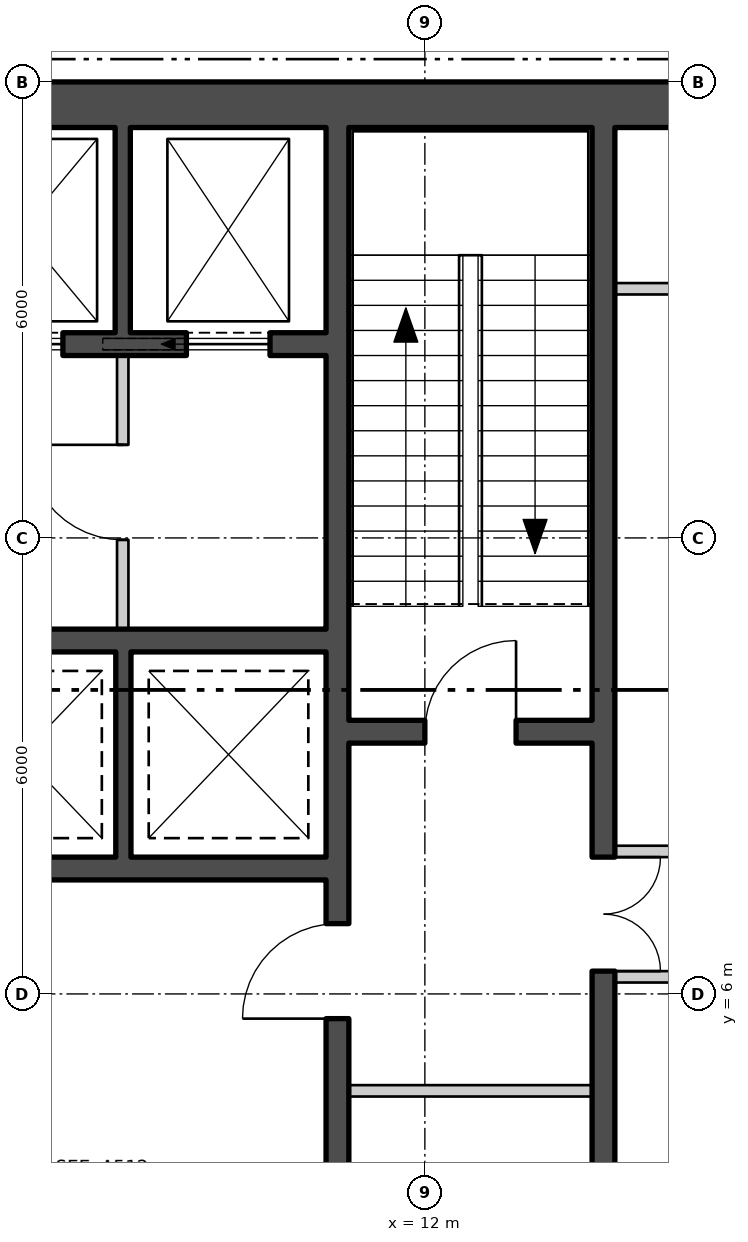
"""IFC4 building model, lengths in metres.
Left out: names, types, materials, properties, quantities, classifications, styles, units other than length and angle.
Written with IfcOpenShell. Run it as: python <this file> out.ifc"""

import sys

from ifc_helpers import new_model, si_unit, direction, frame, frame_2d, origin, place, context, subcontext, project, spatial, polyline, rectangle, outline, extrude, element, fill, save


model = new_model("IFC4")
c1 = context("Model", 3, precision=1e-05, world=origin(), true_north=direction((0.0, 1.0)))
c2 = subcontext(c1, "Body", "Model", "MODEL_VIEW")
j1 = project(units=[si_unit("LENGTHUNIT", "METRE"), si_unit("PLANEANGLEUNIT", "RADIAN")], contexts=[c1])
p1 = place(None, origin())
s1 = spatial("IfcSite", under=j1, at=p1, CompositionType="ELEMENT")
p2 = place(p1, origin())
s2 = spatial("IfcBuilding", under=s1, at=p2, CompositionType="ELEMENT")
p3 = place(p2, frame((0.0, 0.0, 60.3)))
s3 = spatial("IfcBuildingStorey", under=s2, at=p3, CompositionType="ELEMENT", Elevation=60.3)
p4 = place(p3, frame((5.425, -29.042, -0.18), z_axis=(0.0, 0.0, 1.0), x_axis=(0.499999388847, 0.866025756634, 0.0)))
e1 = element("IfcWall", 1, at=p4, inside=s3, PredefinedType="SOLIDWALL", context=c2, shape_type="SweptSolid", body=[
    extrude(outline(polyline([(-0.13, -0.225), (45.88, -0.225), (45.62, 0.225), (0.13, 0.225), (-0.13, -0.225)])), origin(), (0.0, 0.0, 1.0), 4.28),
])
p5 = place(p4, frame((1.425, 0.0, 1.08)))
e2 = element("IfcOpeningElement", 2, at=p5, cuts=e1, PredefinedType="OPENING", context=c2, shape_type="SweptSolid", body=[
    extrude(rectangle(XDim=2.4, YDim=2.6, at=frame_2d((1.2, 1.3))), frame((0.0, 0.235, 0.0), z_axis=(0.0, -1.0, 0.0), x_axis=(1.0, 0.0, 0.0)), (0.0, 0.0, 1.0), 0.47),
])
p6 = place(p4, frame((5.895, 0.0, 1.08)))
e3 = element("IfcOpeningElement", 3, at=p6, cuts=e1, PredefinedType="OPENING", context=c2, shape_type="SweptSolid", body=[
    extrude(rectangle(XDim=2.4, YDim=2.6, at=frame_2d((1.2, 1.3))), frame((0.0, 0.235, 0.0), z_axis=(0.0, -1.0, 0.0), x_axis=(1.0, 0.0, 0.0)), (0.0, 0.0, 1.0), 0.47),
])
p7 = place(p4, frame((10.403, 0.0, 1.08)))
e4 = element("IfcOpeningElement", 4, at=p7, cuts=e1, PredefinedType="OPENING", context=c2, shape_type="SweptSolid", body=[
    extrude(rectangle(XDim=2.4, YDim=2.6, at=frame_2d((1.2, 1.3))), frame((0.0, 0.235, 0.0), z_axis=(0.0, -1.0, 0.0), x_axis=(1.0, 0.0, 0.0)), (0.0, 0.0, 1.0), 0.47),
])
p8 = place(p4, frame((14.912, 0.0, 1.08)))
e5 = element("IfcOpeningElement", 5, at=p8, cuts=e1, PredefinedType="OPENING", context=c2, shape_type="SweptSolid", body=[
    extrude(rectangle(XDim=2.4, YDim=2.6, at=frame_2d((1.2, 1.3))), frame((0.0, 0.235, 0.0), z_axis=(0.0, -1.0, 0.0), x_axis=(1.0, 0.0, 0.0)), (0.0, 0.0, 1.0), 0.47),
])
p9 = place(p4, frame((19.421, 0.0, 1.08)))
e6 = element("IfcOpeningElement", 6, at=p9, cuts=e1, PredefinedType="OPENING", context=c2, shape_type="SweptSolid", body=[
    extrude(rectangle(XDim=2.4, YDim=2.6, at=frame_2d((1.2, 1.3))), frame((0.0, 0.235, 0.0), z_axis=(0.0, -1.0, 0.0), x_axis=(1.0, 0.0, 0.0)), (0.0, 0.0, 1.0), 0.47),
])
p10 = place(p4, frame((23.929, 0.0, 1.08)))
e7 = element("IfcOpeningElement", 7, at=p10, cuts=e1, PredefinedType="OPENING", context=c2, shape_type="SweptSolid", body=[
    extrude(rectangle(XDim=2.4, YDim=2.6, at=frame_2d((1.2, 1.3))), frame((0.0, 0.235, 0.0), z_axis=(0.0, -1.0, 0.0), x_axis=(1.0, 0.0, 0.0)), (0.0, 0.0, 1.0), 0.47),
])
p11 = place(p4, frame((28.438, 0.0, 1.08)))
e8 = element("IfcOpeningElement", 8, at=p11, cuts=e1, PredefinedType="OPENING", context=c2, shape_type="SweptSolid", body=[
    extrude(rectangle(XDim=2.4, YDim=2.6, at=frame_2d((1.2, 1.3))), frame((0.0, 0.235, 0.0), z_axis=(0.0, -1.0, 0.0), x_axis=(1.0, 0.0, 0.0)), (0.0, 0.0, 1.0), 0.47),
])
p12 = place(p4, frame((32.947, 0.0, 1.08)))
e9 = element("IfcOpeningElement", 9, at=p12, cuts=e1, PredefinedType="OPENING", context=c2, shape_type="SweptSolid", body=[
    extrude(rectangle(XDim=2.4, YDim=2.6, at=frame_2d((1.2, 1.3))), frame((0.0, 0.235, 0.0), z_axis=(0.0, -1.0, 0.0), x_axis=(1.0, 0.0, 0.0)), (0.0, 0.0, 1.0), 0.47),
])
p13 = place(p4, frame((37.455, 0.0, 1.08)))
e10 = element("IfcOpeningElement", 10, at=p13, cuts=e1, PredefinedType="OPENING", context=c2, shape_type="SweptSolid", body=[
    extrude(rectangle(XDim=2.4, YDim=2.6, at=frame_2d((1.2, 1.3))), frame((0.0, 0.235, 0.0), z_axis=(0.0, -1.0, 0.0), x_axis=(1.0, 0.0, 0.0)), (0.0, 0.0, 1.0), 0.47),
])
p14 = place(p4, frame((41.925, 0.0, 1.08)))
e11 = element("IfcOpeningElement", 11, at=p14, cuts=e1, PredefinedType="OPENING", context=c2, shape_type="SweptSolid", body=[
    extrude(rectangle(XDim=2.4, YDim=2.6, at=frame_2d((1.2, 1.3))), frame((0.0, 0.235, 0.0), z_axis=(0.0, -1.0, 0.0), x_axis=(1.0, 0.0, 0.0)), (0.0, 0.0, 1.0), 0.47),
])
p15 = place(p3, frame((-17.5, 17.7, 0.0), z_axis=(0.0, 0.0, 1.0), x_axis=(1.0, 0.0, 0.0)))
e12 = element("IfcWall", 12, at=p15, inside=s3, PredefinedType="SHEAR", context=c2, shape_type="SweptSolid", body=[
    extrude(rectangle(XDim=35.0, YDim=0.6, at=frame_2d((17.5, 0.0))), origin(), (0.0, 0.0, 1.0), 4.3),
])
p16 = place(p3, frame((10.85, 0.6, 0.0), z_axis=(0.0, 0.0, 1.0), x_axis=(0.0, 1.0, 0.0)))
e13 = element("IfcWall", 13, at=p16, inside=s3, PredefinedType="SHEAR", context=c2, shape_type="SweptSolid", body=[
    extrude(rectangle(XDim=16.8, YDim=0.3, at=frame_2d((8.4, 0.0))), origin(), (0.0, 0.0, 1.0), 4.3),
])
p17 = place(p16, frame((5.075, 0.0, 0.0)))
e14 = element("IfcOpeningElement", 14, at=p17, cuts=e13, PredefinedType="OPENING", context=c2, shape_type="SweptSolid", body=[
    extrude(rectangle(XDim=1.25, YDim=2.1, at=frame_2d((0.625, 1.05))), frame((0.0, 0.16, 0.0), z_axis=(0.0, -1.0, 0.0), x_axis=(1.0, 0.0, 0.0)), (0.0, 0.0, 1.0), 0.32),
])
p18 = place(p16, frame((1.525, 0.0, 0.0)))
e15 = element("IfcOpeningElement", 15, at=p18, cuts=e13, PredefinedType="OPENING", context=c2, shape_type="SweptSolid", body=[
    extrude(rectangle(XDim=1.0, YDim=2.1, at=frame_2d((0.5, 1.05))), frame((0.0, 0.16, 0.0), z_axis=(0.0, -1.0, 0.0), x_axis=(1.0, 0.0, 0.0)), (0.0, 0.0, 1.0), 0.32),
])
p19 = place(p3, frame((14.35, 0.6, 0.0), z_axis=(0.0, 0.0, 1.0), x_axis=(0.0, 1.0, 0.0)))
e16 = element("IfcWall", 16, at=p19, inside=s3, PredefinedType="SHEAR", context=c2, shape_type="SweptSolid", body=[
    extrude(rectangle(XDim=16.8, YDim=0.3, at=frame_2d((8.4, 0.0))), origin(), (0.0, 0.0, 1.0), 4.3),
])
p20 = place(p19, frame((5.7, 0.0, 0.0)))
e17 = element("IfcOpeningElement", 17, at=p20, cuts=e16, PredefinedType="OPENING", context=c2, shape_type="SweptSolid", body=[
    extrude(rectangle(XDim=1.5, YDim=2.1, at=frame_2d((0.75, 1.05))), frame((0.0, 0.16, 0.0), z_axis=(0.0, -1.0, 0.0), x_axis=(1.0, 0.0, 0.0)), (0.0, 0.0, 1.0), 0.32),
])
p21 = place(p3, frame((11.0, 9.45, 0.0), z_axis=(0.0, 0.0, 1.0), x_axis=(1.0, 0.0, 0.0)))
e18 = element("IfcWall", 18, at=p21, inside=s3, PredefinedType="SHEAR", context=c2, shape_type="SweptSolid", body=[
    extrude(rectangle(XDim=3.2, YDim=0.3, at=frame_2d((1.6, 0.0))), origin(), (0.0, 0.0, 1.0), 4.3),
])
p22 = place(p21, frame((1.0, 0.0, 0.0)))
e19 = element("IfcOpeningElement", 19, at=p22, cuts=e18, PredefinedType="OPENING", context=c2, shape_type="SweptSolid", body=[
    extrude(rectangle(XDim=1.2, YDim=2.1, at=frame_2d((0.6, 1.05))), frame((0.0, 0.16, 0.0), z_axis=(0.0, -1.0, 0.0), x_axis=(1.0, 0.0, 0.0)), (0.0, 0.0, 1.0), 0.32),
])
p23 = place(p3, frame((-10.7, 14.55, 0.0), z_axis=(0.0, 0.0, 1.0), x_axis=(1.0, 0.0, 0.0)))
e20 = element("IfcWall", 20, at=p23, inside=s3, PredefinedType="SHEAR", context=c2, shape_type="SweptSolid", body=[
    extrude(rectangle(XDim=21.4, YDim=0.3, at=frame_2d((10.7, 0.0))), origin(), (0.0, 0.0, 1.0), 4.3),
])
p24 = place(p23, frame((0.738, 0.0, 0.0)))
e21 = element("IfcOpeningElement", 21, at=p24, cuts=e20, PredefinedType="OPENING", context=c2, shape_type="SweptSolid", body=[
    extrude(rectangle(XDim=1.1, YDim=2.1, at=frame_2d((0.55, 1.05))), frame((0.0, 0.16, 0.0), z_axis=(0.0, -1.0, 0.0), x_axis=(1.0, 0.0, 0.0)), (0.0, 0.0, 1.0), 0.32),
])
p25 = place(p23, frame((3.462, 0.0, 0.0)))
e22 = element("IfcOpeningElement", 22, at=p25, cuts=e20, PredefinedType="OPENING", context=c2, shape_type="SweptSolid", body=[
    extrude(rectangle(XDim=1.1, YDim=2.1, at=frame_2d((0.55, 1.05))), frame((0.0, 0.16, 0.0), z_axis=(0.0, -1.0, 0.0), x_axis=(1.0, 0.0, 0.0)), (0.0, 0.0, 1.0), 0.32),
])
p26 = place(p23, frame((6.138, 0.0, 0.0)))
e23 = element("IfcOpeningElement", 23, at=p26, cuts=e20, PredefinedType="OPENING", context=c2, shape_type="SweptSolid", body=[
    extrude(rectangle(XDim=1.1, YDim=2.1, at=frame_2d((0.55, 1.05))), frame((0.0, 0.16, 0.0), z_axis=(0.0, -1.0, 0.0), x_axis=(1.0, 0.0, 0.0)), (0.0, 0.0, 1.0), 0.32),
])
p27 = place(p23, frame((8.812, 0.0, 0.0)))
e24 = element("IfcOpeningElement", 24, at=p27, cuts=e20, PredefinedType="OPENING", context=c2, shape_type="SweptSolid", body=[
    extrude(rectangle(XDim=1.1, YDim=2.1, at=frame_2d((0.55, 1.05))), frame((0.0, 0.16, 0.0), z_axis=(0.0, -1.0, 0.0), x_axis=(1.0, 0.0, 0.0)), (0.0, 0.0, 1.0), 0.32),
])
p28 = place(p23, frame((14.162, 0.0, 0.0)))
e25 = element("IfcOpeningElement", 25, at=p28, cuts=e20, PredefinedType="OPENING", context=c2, shape_type="SweptSolid", body=[
    extrude(rectangle(XDim=1.1, YDim=2.1, at=frame_2d((0.55, 1.05))), frame((0.0, 0.16, 0.0), z_axis=(0.0, -1.0, 0.0), x_axis=(1.0, 0.0, 0.0)), (0.0, 0.0, 1.0), 0.32),
])
p29 = place(p23, frame((16.837, 0.0, 0.0)))
e26 = element("IfcOpeningElement", 26, at=p29, cuts=e20, PredefinedType="OPENING", context=c2, shape_type="SweptSolid", body=[
    extrude(rectangle(XDim=1.1, YDim=2.1, at=frame_2d((0.55, 1.05))), frame((0.0, 0.16, 0.0), z_axis=(0.0, -1.0, 0.0), x_axis=(1.0, 0.0, 0.0)), (0.0, 0.0, 1.0), 0.32),
])
p30 = place(p23, frame((19.562, 0.0, 0.0)))
e27 = element("IfcOpeningElement", 27, at=p30, cuts=e20, PredefinedType="OPENING", context=c2, shape_type="SweptSolid", body=[
    extrude(rectangle(XDim=1.1, YDim=2.1, at=frame_2d((0.55, 1.05))), frame((0.0, 0.16, 0.0), z_axis=(0.0, -1.0, 0.0), x_axis=(1.0, 0.0, 0.0)), (0.0, 0.0, 1.0), 0.32),
])
for number, where, z_axis, x_axis in (
    (28, (2.6, 10.65, 0.0), (0.0, 0.0, 1.0), (1.0, 0.0, 0.0)),
    (29, (2.6, 7.65, 0.0), (0.0, 0.0, 1.0), (1.0, 0.0, 0.0)),
):
    element("IfcWall", number, at=place(p3, frame(where, z_axis=z_axis, x_axis=x_axis)), inside=s3, PredefinedType="SHEAR", context=c2, shape_type="SweptSolid", body=[
        extrude(rectangle(XDim=8.1, YDim=0.3, at=frame_2d((4.05, 0.0))), origin(), (0.0, 0.0, 1.0), 4.3),
    ])
for number, where, z_axis, x_axis in (
    (30, (8.025, 14.7, 0.0), (0.0, 0.0, 1.0), (0.0, 1.0, 0.0)),
    (31, (8.033, 7.8, 0.0), (0.0, 0.0, 1.0), (0.0, 1.0, 0.0)),
):
    element("IfcWall", number, at=place(p3, frame(where, z_axis=z_axis, x_axis=x_axis)), inside=s3, PredefinedType="SHEAR", context=c2, shape_type="SweptSolid", body=[
        extrude(rectangle(XDim=2.7, YDim=0.2, at=frame_2d((1.35, 0.0))), origin(), (0.0, 0.0, 1.0), 4.3),
    ])
p31 = place(p3, frame((8.025, 10.8, 0.0), z_axis=(0.0, 0.0, 1.0), x_axis=(0.0, 1.0, 0.0)))
e32 = element("IfcWall", 32, at=p31, inside=s3, PredefinedType="PARTITIONING", context=c2, shape_type="SweptSolid", body=[
    extrude(rectangle(XDim=3.6, YDim=0.15, at=frame_2d((1.8, 0.0))), origin(), (0.0, 0.0, 1.0), 4.3),
])
p32 = place(p31, frame((1.175, 0.0, 0.0)))
e33 = element("IfcOpeningElement", 33, at=p32, cuts=e32, PredefinedType="OPENING", context=c2, shape_type="SweptSolid", body=[
    extrude(rectangle(XDim=1.25, YDim=2.1, at=frame_2d((0.625, 1.05))), frame((0.0, 0.085, 0.0), z_axis=(0.0, -1.0, 0.0), x_axis=(1.0, 0.0, 0.0)), (0.0, 0.0, 1.0), 0.17),
])
p33 = place(p3, frame((11.0, 4.725, 0.0), z_axis=(0.0, 0.0, 1.0), x_axis=(1.0, 0.0, 0.0)))
e34 = element("IfcWall", 34, at=p33, inside=s3, PredefinedType="PARTITIONING", context=c2, shape_type="SweptSolid", body=[
    extrude(rectangle(XDim=3.2, YDim=0.15, at=frame_2d((1.6, 0.0))), origin(), (0.0, 0.0, 1.0), 4.3),
])
for number, where, z_axis, x_axis in (
    (35, (14.5, 6.225, 0.0), (0.0, 0.0, 1.0), (1.0, 0.0, 0.0)),
    (36, (14.5, 7.875, 0.0), (0.0, 0.0, 1.0), (1.0, 0.0, 0.0)),
    (37, (14.5, 15.278, 0.0), (0.0, 0.0, 1.0), (1.0, 0.0, 0.0)),
):
    element("IfcWall", number, at=place(p3, frame(where, z_axis=z_axis, x_axis=x_axis)), inside=s3, PredefinedType="PARTITIONING", context=c2, shape_type="SweptSolid", body=[
        extrude(rectangle(XDim=2.4, YDim=0.15, at=frame_2d((1.2, 0.0))), origin(), (0.0, 0.0, 1.0), 4.3),
    ])
p34 = place(p29, origin())
e38 = element("IfcDoor", 38, at=p34, inside=s3, OperationType="SLIDING_TO_LEFT", PredefinedType="DOOR", context=c2, shape_type="SweptSolid", body=[
    extrude(rectangle(XDim=1.1, YDim=2.1, at=frame_2d((0.55, 1.05))), frame((0.0, 0.025, 0.0), z_axis=(0.0, -1.0, 0.0), x_axis=(1.0, 0.0, 0.0)), (0.0, 0.0, 1.0), 0.05),
])
fill(e26, e38)
p35 = place(p30, origin())
e39 = element("IfcDoor", 39, at=p35, inside=s3, OperationType="SLIDING_TO_LEFT", PredefinedType="DOOR", context=c2, shape_type="SweptSolid", body=[
    extrude(rectangle(XDim=1.1, YDim=2.1, at=frame_2d((0.55, 1.05))), frame((0.0, 0.025, 0.0), z_axis=(0.0, -1.0, 0.0), x_axis=(1.0, 0.0, 0.0)), (0.0, 0.0, 1.0), 0.05),
])
fill(e27, e39)
p36 = place(p32, origin())
e40 = element("IfcDoor", 40, at=p36, inside=s3, OperationType="SINGLE_SWING_LEFT", PredefinedType="DOOR", context=c2, shape_type="SweptSolid", body=[
    extrude(rectangle(XDim=1.25, YDim=2.1, at=frame_2d((0.625, 1.05))), frame((0.0, 0.025, 0.0), z_axis=(0.0, -1.0, 0.0), x_axis=(1.0, 0.0, 0.0)), (0.0, 0.0, 1.0), 0.05),
])
fill(e33, e40)
p37 = place(p22, origin())
e41 = element("IfcDoor", 41, at=p37, inside=s3, OperationType="SINGLE_SWING_LEFT", PredefinedType="DOOR", context=c2, shape_type="SweptSolid", body=[
    extrude(rectangle(XDim=1.2, YDim=2.1, at=frame_2d((0.6, 1.05))), frame((0.0, 0.025, 0.0), z_axis=(0.0, -1.0, 0.0), x_axis=(1.0, 0.0, 0.0)), (0.0, 0.0, 1.0), 0.05),
])
fill(e19, e41)
p38 = place(p17, origin())
e42 = element("IfcDoor", 42, at=p38, inside=s3, OperationType="SINGLE_SWING_RIGHT", PredefinedType="DOOR", context=c2, shape_type="SweptSolid", body=[
    extrude(rectangle(XDim=1.25, YDim=2.1, at=frame_2d((0.625, 1.05))), frame((0.0, 0.025, 0.0), z_axis=(0.0, -1.0, 0.0), x_axis=(1.0, 0.0, 0.0)), (0.0, 0.0, 1.0), 0.05),
])
fill(e14, e42)
p39 = place(p20, origin())
e43 = element("IfcDoor", 43, at=p39, inside=s3, OperationType="DOUBLE_DOOR_SINGLE_SWING", PredefinedType="DOOR", context=c2, shape_type="SweptSolid", body=[
    extrude(rectangle(XDim=1.5, YDim=2.1, at=frame_2d((0.75, 1.05))), frame((0.0, 0.025, 0.0), z_axis=(0.0, -1.0, 0.0), x_axis=(1.0, 0.0, 0.0)), (0.0, 0.0, 1.0), 0.05),
])
fill(e17, e43)
save(model, sys.argv[1])
